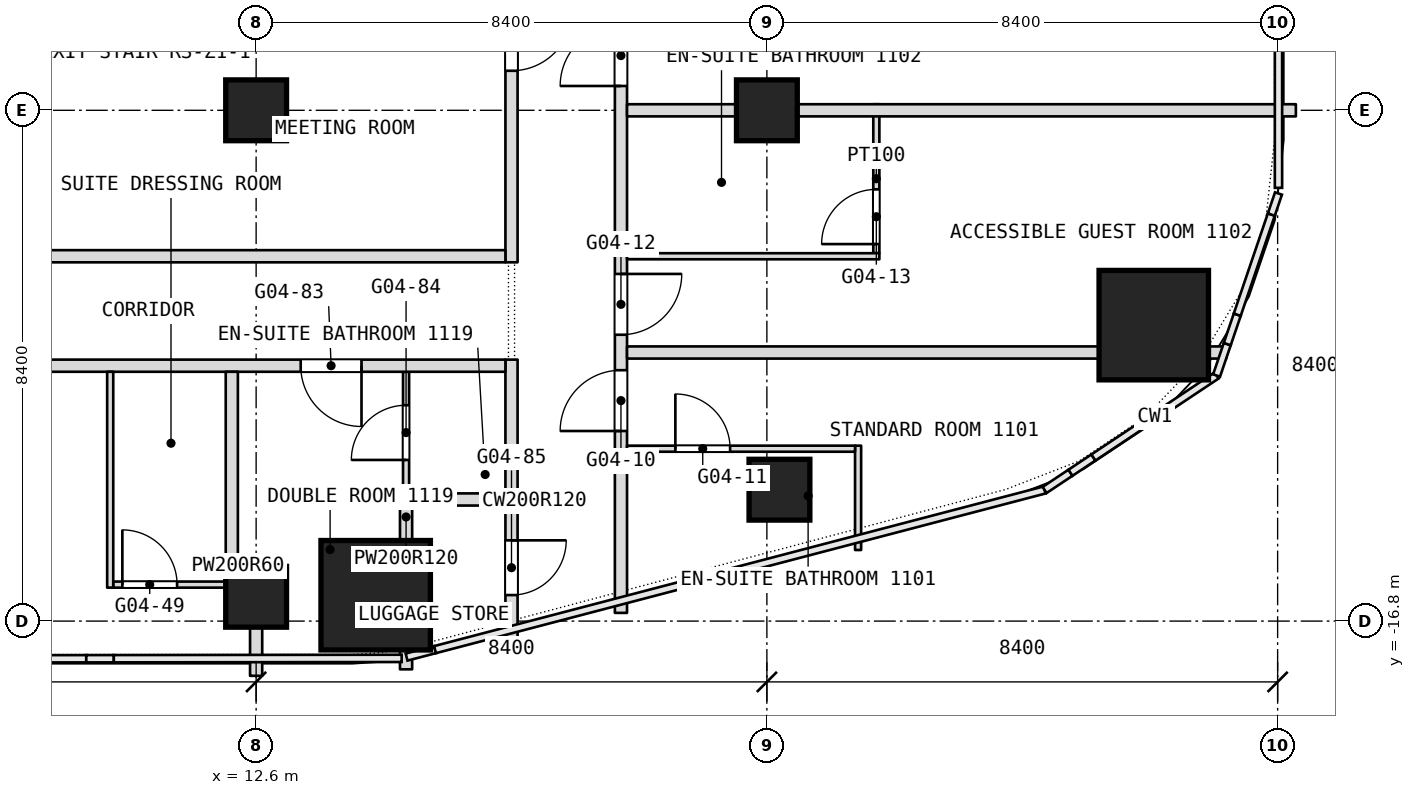
"""IFC4 building model, lengths in metres.
Left out: names, types, materials, properties, quantities, classifications, styles, units other than length and angle.
Written with IfcOpenShell. Run it as: python <this file> out.ifc"""

import sys

from ifc_helpers import new_model, si_unit, direction, frame, frame_2d, origin, origin_2d, place, context, subcontext, project, spatial, rectangle, extrude, element, fill, save


model = new_model("IFC4")
c1 = context("Model", 3, precision=1e-05, world=origin(), true_north=direction((0.0, 1.0)))
c2 = subcontext(c1, "Body", "Model", "MODEL_VIEW")
j1 = project(units=[si_unit("LENGTHUNIT", "METRE"), si_unit("PLANEANGLEUNIT", "RADIAN")], contexts=[c1])
p1 = place(None, origin())
s1 = spatial("IfcSite", under=j1, at=p1, CompositionType="ELEMENT")
p2 = place(p1, origin())
s2 = spatial("IfcBuilding", under=s1, at=p2, CompositionType="ELEMENT")
p3 = place(p2, frame((0.0, 0.0, 54.5)))
s3 = spatial("IfcBuildingStorey", under=s2, at=p3, CompositionType="ELEMENT", Elevation=54.5)
for number, where, z_axis, x_axis in (
    (1, (14.566, -16.375, 0.0), (0.0, 0.0, 1.0), (1.0, 0.0, 0.0)),
    (2, (27.363, -11.933, 0.0), (0.0, 0.0, 1.0), (1.0, 0.0, 0.0)),
):
    element("IfcColumn", number, at=place(p3, frame(where, z_axis=z_axis, x_axis=x_axis)), inside=s3, PredefinedType="COLUMN", context=c2, shape_type="SweptSolid", body=[
        extrude(rectangle(XDim=1.8, YDim=1.8, at=origin_2d()), origin(), (0.0, 0.0, 1.0), 3.6),
    ])
for number, where, z_axis, x_axis in (
    (3, (12.6, -8.4, 0.0), (0.0, 0.0, 1.0), (1.0, 0.0, 0.0)),
    (4, (21.0, -8.4, 0.0), (0.0, 0.0, 1.0), (1.0, 0.0, 0.0)),
    (5, (21.207, -14.639, 0.0), (0.0, 0.0, 1.0), (1.0, 0.0, 0.0)),
    (6, (12.6, -16.4, 0.0), (0.0, 0.0, 1.0), (1.0, 0.0, 0.0)),
):
    element("IfcColumn", number, at=place(p3, frame(where, z_axis=z_axis, x_axis=x_axis)), inside=s3, PredefinedType="COLUMN", context=c2, shape_type="SweptSolid", body=[
        extrude(rectangle(XDim=1.0, YDim=1.0, at=origin_2d()), origin(), (0.0, 0.0, 1.0), 3.6),
    ])
p4 = place(p3, frame((22.8, -10.75, 0.0), z_axis=(0.0, 0.0, 1.0), x_axis=(0.0, 1.0, 0.0)))
e7 = element("IfcWall", 7, at=p4, inside=s3, PredefinedType="PARTITIONING", context=c2, shape_type="SweptSolid", body=[
    extrude(rectangle(XDim=2.45, YDim=0.1, at=frame_2d((1.225, 0.0))), origin(), (0.0, 0.0, 1.0), 3.34),
])
p5 = place(p4, frame((0.15, 0.0, 0.0)))
e8 = element("IfcOpeningElement", 8, at=p5, cuts=e7, PredefinedType="OPENING", context=c2, shape_type="SweptSolid", body=[
    extrude(rectangle(XDim=0.9, YDim=2.1, at=frame_2d((0.45, 1.05))), frame((0.0, 0.05, 0.0), z_axis=(0.0, -1.0, 0.0), x_axis=(1.0, 0.0, 0.0)), (0.0, 0.0, 1.0), 0.1),
])
p6 = place(p3, frame((22.5, -15.631, 0.0), z_axis=(0.0, 0.0, 1.0), x_axis=(0.0, 1.0, 0.0)))
e9 = element("IfcWall", 9, at=p6, inside=s3, PredefinedType="PARTITIONING", context=c2, shape_type="SweptSolid", body=[
    extrude(rectangle(XDim=1.716, YDim=0.1, at=frame_2d((0.858, 0.0))), origin(), (0.0, 0.0, 1.0), 3.34),
])
p7 = place(p3, frame((18.6, -16.665, 0.0), z_axis=(0.0, 0.0, 1.0), x_axis=(0.0, 1.0, 0.0)))
e10 = element("IfcWall", 10, at=p7, inside=s3, PredefinedType="PARTITIONING", context=c2, shape_type="SweptSolid", body=[
    extrude(rectangle(XDim=50.205, YDim=0.2, at=frame_2d((25.103, 0.0))), origin(), (0.0, 0.0, 1.0), 3.34),
])
p8 = place(p7, frame((2.991, 0.0, 0.0)))
e11 = element("IfcOpeningElement", 11, at=p8, cuts=e10, PredefinedType="OPENING", context=c2, shape_type="SweptSolid", body=[
    extrude(rectangle(XDim=1.0, YDim=2.1, at=frame_2d((0.5, 1.05))), frame((0.0, 0.1, 0.0), z_axis=(0.0, -1.0, 0.0), x_axis=(1.0, 0.0, 0.0)), (0.0, 0.0, 1.0), 0.2),
])
p9 = place(p7, frame((4.574, 0.0, 0.0)))
e12 = element("IfcOpeningElement", 12, at=p9, cuts=e10, PredefinedType="OPENING", context=c2, shape_type="SweptSolid", body=[
    extrude(rectangle(XDim=1.0, YDim=2.1, at=frame_2d((0.5, 1.05))), frame((0.0, 0.1, 0.0), z_axis=(0.0, -1.0, 0.0), x_axis=(1.0, 0.0, 0.0)), (0.0, 0.0, 1.0), 0.2),
])
p10 = place(p7, frame((8.665, 0.0, 0.0)))
e13 = element("IfcOpeningElement", 13, at=p10, cuts=e10, PredefinedType="OPENING", context=c2, shape_type="SweptSolid", body=[
    extrude(rectangle(XDim=1.0, YDim=2.1, at=frame_2d((0.5, 1.05))), frame((0.0, 0.1, 0.0), z_axis=(0.0, -1.0, 0.0), x_axis=(1.0, 0.0, 0.0)), (0.0, 0.0, 1.0), 0.2),
])
p11 = place(p7, frame((15.265, 0.0, 0.0)))
e14 = element("IfcOpeningElement", 14, at=p11, cuts=e10, PredefinedType="OPENING", context=c2, shape_type="SweptSolid", body=[
    extrude(rectangle(XDim=1.0, YDim=2.1, at=frame_2d((0.5, 1.05))), frame((0.0, 0.1, 0.0), z_axis=(0.0, -1.0, 0.0), x_axis=(1.0, 0.0, 0.0)), (0.0, 0.0, 1.0), 0.2),
])
p12 = place(p7, frame((19.465, 0.0, 0.0)))
e15 = element("IfcOpeningElement", 15, at=p12, cuts=e10, PredefinedType="OPENING", context=c2, shape_type="SweptSolid", body=[
    extrude(rectangle(XDim=1.0, YDim=2.1, at=frame_2d((0.5, 1.05))), frame((0.0, 0.1, 0.0), z_axis=(0.0, -1.0, 0.0), x_axis=(1.0, 0.0, 0.0)), (0.0, 0.0, 1.0), 0.2),
])
p13 = place(p7, frame((21.265, 0.0, 0.0)))
e16 = element("IfcOpeningElement", 16, at=p13, cuts=e10, PredefinedType="OPENING", context=c2, shape_type="SweptSolid", body=[
    extrude(rectangle(XDim=1.0, YDim=2.1, at=frame_2d((0.5, 1.05))), frame((0.0, 0.1, 0.0), z_axis=(0.0, -1.0, 0.0), x_axis=(1.0, 0.0, 0.0)), (0.0, 0.0, 1.0), 0.2),
])
p14 = place(p7, frame((28.365, 0.0, 0.0)))
e17 = element("IfcOpeningElement", 17, at=p14, cuts=e10, PredefinedType="OPENING", context=c2, shape_type="SweptSolid", body=[
    extrude(rectangle(XDim=1.8, YDim=2.1, at=frame_2d((0.9, 1.05))), frame((0.0, 0.1, 0.0), z_axis=(0.0, -1.0, 0.0), x_axis=(1.0, 0.0, 0.0)), (0.0, 0.0, 1.0), 0.2),
])
p15 = place(p7, frame((37.165, 0.0, 0.0)))
e18 = element("IfcOpeningElement", 18, at=p15, cuts=e10, PredefinedType="OPENING", context=c2, shape_type="SweptSolid", body=[
    extrude(rectangle(XDim=1.1, YDim=2.1, at=frame_2d((0.55, 1.05))), frame((0.0, 0.1, 0.0), z_axis=(0.0, -1.0, 0.0), x_axis=(1.0, 0.0, 0.0)), (0.0, 0.0, 1.0), 0.2),
])
p16 = place(p7, frame((43.415, 0.0, 0.0)))
e19 = element("IfcOpeningElement", 19, at=p16, cuts=e10, PredefinedType="OPENING", context=c2, shape_type="SweptSolid", body=[
    extrude(rectangle(XDim=1.1, YDim=2.1, at=frame_2d((0.55, 1.05))), frame((0.0, 0.1, 0.0), z_axis=(0.0, -1.0, 0.0), x_axis=(1.0, 0.0, 0.0)), (0.0, 0.0, 1.0), 0.2),
])
p17 = place(p3, frame((16.8, -17.143, 0.0), z_axis=(0.0, 0.0, 1.0), x_axis=(0.0, 1.0, 0.0)))
e20 = element("IfcWall", 20, at=p17, inside=s3, PredefinedType="PARTITIONING", context=c2, shape_type="SweptSolid", body=[
    extrude(rectangle(XDim=4.643, YDim=0.2, at=frame_2d((2.322, 0.0))), origin(), (0.0, 0.0, 1.0), 3.34),
])
p18 = place(p17, frame((0.771, 0.0, 0.0)))
e21 = element("IfcOpeningElement", 21, at=p18, cuts=e20, PredefinedType="OPENING", context=c2, shape_type="SweptSolid", body=[
    extrude(rectangle(XDim=0.9, YDim=2.1, at=frame_2d((0.45, 1.05))), frame((0.0, 0.1, 0.0), z_axis=(0.0, -1.0, 0.0), x_axis=(1.0, 0.0, 0.0)), (0.0, 0.0, 1.0), 0.2),
])
p19 = place(p3, frame((16.8, -10.9, 0.0), z_axis=(0.0, 0.0, 1.0), x_axis=(0.0, 1.0, 0.0)))
e22 = element("IfcWall", 22, at=p19, inside=s3, PredefinedType="PARTITIONING", context=c2, shape_type="SweptSolid", body=[
    extrude(rectangle(XDim=7.3, YDim=0.2, at=frame_2d((3.65, 0.0))), origin(), (0.0, 0.0, 1.0), 3.34),
])
p20 = place(p19, frame((3.15, 0.0, 0.0)))
e23 = element("IfcOpeningElement", 23, at=p20, cuts=e22, PredefinedType="OPENING", context=c2, shape_type="SweptSolid", body=[
    extrude(rectangle(XDim=1.0, YDim=2.1, at=frame_2d((0.5, 1.05))), frame((0.0, 0.1, 0.0), z_axis=(0.0, -1.0, 0.0), x_axis=(1.0, 0.0, 0.0)), (0.0, 0.0, 1.0), 0.2),
])
p21 = place(p3, frame((10.25, -16.2, 0.0), z_axis=(0.0, 0.0, 1.0), x_axis=(1.0, 0.0, 0.0)))
e24 = element("IfcWall", 24, at=p21, inside=s3, PredefinedType="PARTITIONING", context=c2, shape_type="SweptSolid", body=[
    extrude(rectangle(XDim=2.45, YDim=0.1, at=frame_2d((1.225, 0.0))), origin(), (0.0, 0.0, 1.0), 3.34),
])
p22 = place(p21, frame((0.15, 0.0, 0.0)))
e25 = element("IfcOpeningElement", 25, at=p22, cuts=e24, PredefinedType="OPENING", context=c2, shape_type="SweptSolid", body=[
    extrude(rectangle(XDim=0.9, YDim=2.1, at=frame_2d((0.45, 1.05))), frame((0.0, 0.05, 0.0), z_axis=(0.0, -1.0, 0.0), x_axis=(1.0, 0.0, 0.0)), (0.0, 0.0, 1.0), 0.1),
])
p23 = place(p3, frame((12.1, -15.9, 0.0), z_axis=(0.0, 0.0, 1.0), x_axis=(1.0, 0.0, 0.0)))
e26 = element("IfcWall", 26, at=p23, inside=s3, PredefinedType="PARTITIONING", context=c2, shape_type="SweptSolid", body=[
    extrude(rectangle(XDim=0.4, YDim=0.2, at=frame_2d((0.2, 0.0))), origin(), (0.0, 0.0, 1.0), 3.34),
])
p24 = place(p3, frame((15.066, -17.593, 0.0), z_axis=(0.0, 0.0, 1.0), x_axis=(0.0, 1.0, 0.0)))
e27 = element("IfcWall", 27, at=p24, inside=s3, PredefinedType="PARTITIONING", context=c2, shape_type="SweptSolid", body=[
    extrude(rectangle(XDim=0.318, YDim=0.2, at=frame_2d((0.159, 0.0))), origin(), (0.0, 0.0, 1.0), 3.34),
])
p25 = place(p3, frame((15.066, -15.475, 0.0), z_axis=(0.0, 0.0, 1.0), x_axis=(0.0, 1.0, 0.0)))
e28 = element("IfcWall", 28, at=p25, inside=s3, PredefinedType="PARTITIONING", context=c2, shape_type="SweptSolid", body=[
    extrude(rectangle(XDim=0.775, YDim=0.2, at=frame_2d((0.388, 0.0))), origin(), (0.0, 0.0, 1.0), 3.34),
])
p26 = place(p3, frame((15.066, -14.9, 0.0), z_axis=(0.0, 0.0, 1.0), x_axis=(0.0, 1.0, 0.0)))
e29 = element("IfcWall", 29, at=p26, inside=s3, PredefinedType="PARTITIONING", context=c2, shape_type="SweptSolid", body=[
    extrude(rectangle(XDim=2.2, YDim=0.1, at=frame_2d((1.1, 0.0))), origin(), (0.0, 0.0, 1.0), 3.34),
])
p27 = place(p26, frame((0.75, 0.0, 0.0)))
e30 = element("IfcOpeningElement", 30, at=p27, cuts=e29, PredefinedType="OPENING", context=c2, shape_type="SweptSolid", body=[
    extrude(rectangle(XDim=0.9, YDim=2.1, at=frame_2d((0.45, 1.05))), frame((0.0, 0.05, 0.0), z_axis=(0.0, -1.0, 0.0), x_axis=(1.0, 0.0, 0.0)), (0.0, 0.0, 1.0), 0.1),
])
p28 = place(p3, frame((15.116, -14.8, 0.0), z_axis=(0.0, 0.0, 1.0), x_axis=(1.0, 0.0, 0.0)))
e31 = element("IfcWall", 31, at=p28, inside=s3, PredefinedType="PARTITIONING", context=c2, shape_type="SweptSolid", body=[
    extrude(rectangle(XDim=1.584, YDim=0.2, at=frame_2d((0.792, 0.0))), origin(), (0.0, 0.0, 1.0), 3.34),
])
p29 = place(p3, frame((18.7, -13.965, 0.0), z_axis=(0.0, 0.0, 1.0), x_axis=(1.0, 0.0, 0.0)))
e32 = element("IfcWall", 32, at=p29, inside=s3, PredefinedType="PARTITIONING", context=c2, shape_type="SweptSolid", body=[
    extrude(rectangle(XDim=3.75, YDim=0.1, at=frame_2d((1.875, 0.0))), origin(), (0.0, 0.0, 1.0), 3.34),
])
p30 = place(p29, frame((0.795, 0.0, 0.0)))
e33 = element("IfcOpeningElement", 33, at=p30, cuts=e32, PredefinedType="OPENING", context=c2, shape_type="SweptSolid", body=[
    extrude(rectangle(XDim=0.9, YDim=2.1, at=frame_2d((0.45, 1.05))), frame((0.0, 0.05, 0.0), z_axis=(0.0, -1.0, 0.0), x_axis=(1.0, 0.0, 0.0)), (0.0, 0.0, 1.0), 0.1),
])
p31 = place(p3, frame((12.6, -17.7, 0.0), z_axis=(0.0, 0.0, 1.0), x_axis=(0.0, 1.0, 0.0)))
e34 = element("IfcWall", 34, at=p31, inside=s3, PredefinedType="PARTITIONING", context=c2, shape_type="SweptSolid", body=[
    extrude(rectangle(XDim=1.9, YDim=0.2, at=frame_2d((0.95, 0.0))), origin(), (0.0, 0.0, 1.0), 3.34),
])
p32 = place(p3, frame((-16.7, -12.6, 0.0), z_axis=(0.0, 0.0, 1.0), x_axis=(1.0, 0.0, 0.0)))
e35 = element("IfcWall", 35, at=p32, inside=s3, PredefinedType="PARTITIONING", context=c2, shape_type="SweptSolid", body=[
    extrude(rectangle(XDim=33.4, YDim=0.2, at=frame_2d((16.7, 0.0))), origin(), (0.0, 0.0, 1.0), 3.34),
])
p33 = place(p32, frame((6.9, 0.0, 0.0)))
e36 = element("IfcOpeningElement", 36, at=p33, cuts=e35, PredefinedType="OPENING", context=c2, shape_type="SweptSolid", body=[
    extrude(rectangle(XDim=1.0, YDim=2.1, at=frame_2d((0.5, 1.05))), frame((0.0, 0.1, 0.0), z_axis=(0.0, -1.0, 0.0), x_axis=(1.0, 0.0, 0.0)), (0.0, 0.0, 1.0), 0.2),
])
p34 = place(p32, frame((8.7, 0.0, 0.0)))
e37 = element("IfcOpeningElement", 37, at=p34, cuts=e35, PredefinedType="OPENING", context=c2, shape_type="SweptSolid", body=[
    extrude(rectangle(XDim=1.0, YDim=2.1, at=frame_2d((0.5, 1.05))), frame((0.0, 0.1, 0.0), z_axis=(0.0, -1.0, 0.0), x_axis=(1.0, 0.0, 0.0)), (0.0, 0.0, 1.0), 0.2),
])
p35 = place(p32, frame((16.1, 0.0, 0.0)))
e38 = element("IfcOpeningElement", 38, at=p35, cuts=e35, PredefinedType="OPENING", context=c2, shape_type="SweptSolid", body=[
    extrude(rectangle(XDim=1.1, YDim=2.1, at=frame_2d((0.55, 1.05))), frame((0.0, 0.1, 0.0), z_axis=(0.0, -1.0, 0.0), x_axis=(1.0, 0.0, 0.0)), (0.0, 0.0, 1.0), 0.2),
])
p36 = place(p32, frame((24.6, 0.0, 0.0)))
e39 = element("IfcOpeningElement", 39, at=p36, cuts=e35, PredefinedType="OPENING", context=c2, shape_type="SweptSolid", body=[
    extrude(rectangle(XDim=1.1, YDim=2.1, at=frame_2d((0.55, 1.05))), frame((0.0, 0.1, 0.0), z_axis=(0.0, -1.0, 0.0), x_axis=(1.0, 0.0, 0.0)), (0.0, 0.0, 1.0), 0.2),
])
p37 = place(p32, frame((2.317, 0.0, 0.0)))
e40 = element("IfcOpeningElement", 40, at=p37, cuts=e35, PredefinedType="OPENING", context=c2, shape_type="SweptSolid", body=[
    extrude(rectangle(XDim=1.0, YDim=2.1, at=frame_2d((0.5, 1.05))), frame((0.0, 0.1, 0.0), z_axis=(0.0, -1.0, 0.0), x_axis=(1.0, 0.0, 0.0)), (0.0, 0.0, 1.0), 0.2),
])
p38 = place(p32, frame((30.033, 0.0, 0.0)))
e41 = element("IfcOpeningElement", 41, at=p38, cuts=e35, PredefinedType="OPENING", context=c2, shape_type="SweptSolid", body=[
    extrude(rectangle(XDim=1.0, YDim=2.1, at=frame_2d((0.5, 1.05))), frame((0.0, 0.1, 0.0), z_axis=(0.0, -1.0, 0.0), x_axis=(1.0, 0.0, 0.0)), (0.0, 0.0, 1.0), 0.2),
])
p39 = place(p3, frame((18.7, -12.383, 0.0), z_axis=(0.0, 0.0, 1.0), x_axis=(1.0, 0.0, 0.0)))
e42 = element("IfcWall", 42, at=p39, inside=s3, PredefinedType="PARTITIONING", context=c2, shape_type="SweptSolid", body=[
    extrude(rectangle(XDim=7.763, YDim=0.2, at=frame_2d((3.881, 0.0))), origin(), (0.0, 0.0, 1.0), 3.34),
])
p40 = place(p3, frame((28.263, -12.383, 0.0), z_axis=(0.0, 0.0, 1.0), x_axis=(1.0, 0.0, 0.0)))
e43 = element("IfcWall", 43, at=p40, inside=s3, PredefinedType="PARTITIONING", context=c2, shape_type="SweptSolid", body=[
    extrude(rectangle(XDim=0.29, YDim=0.2, at=frame_2d((0.145, 0.0))), origin(), (0.0, 0.0, 1.0), 3.34),
])
p41 = place(p3, frame((12.2, -15.8, 0.0), z_axis=(0.0, 0.0, 1.0), x_axis=(0.0, 1.0, 0.0)))
e44 = element("IfcWall", 44, at=p41, inside=s3, PredefinedType="PARTITIONING", context=c2, shape_type="SweptSolid", body=[
    extrude(rectangle(XDim=3.1, YDim=0.2, at=frame_2d((1.55, 0.0))), origin(), (0.0, 0.0, 1.0), 3.34),
])
p42 = place(p3, frame((-16.7, -10.8, 0.0), z_axis=(0.0, 0.0, 1.0), x_axis=(1.0, 0.0, 0.0)))
e45 = element("IfcWall", 45, at=p42, inside=s3, PredefinedType="PARTITIONING", context=c2, shape_type="SweptSolid", body=[
    extrude(rectangle(XDim=33.4, YDim=0.2, at=frame_2d((16.7, 0.0))), origin(), (0.0, 0.0, 1.0), 3.34),
])
p43 = place(p42, frame((5.7, 0.0, 0.0)))
e46 = element("IfcOpeningElement", 46, at=p43, cuts=e45, PredefinedType="OPENING", context=c2, shape_type="SweptSolid", body=[
    extrude(rectangle(XDim=1.0, YDim=2.1, at=frame_2d((0.5, 1.05))), frame((0.0, 0.1, 0.0), z_axis=(0.0, -1.0, 0.0), x_axis=(1.0, 0.0, 0.0)), (0.0, 0.0, 1.0), 0.2),
])
p44 = place(p42, frame((18.3, 0.0, 0.0)))
e47 = element("IfcOpeningElement", 47, at=p44, cuts=e45, PredefinedType="OPENING", context=c2, shape_type="SweptSolid", body=[
    extrude(rectangle(XDim=1.0, YDim=2.1, at=frame_2d((0.5, 1.05))), frame((0.0, 0.1, 0.0), z_axis=(0.0, -1.0, 0.0), x_axis=(1.0, 0.0, 0.0)), (0.0, 0.0, 1.0), 0.2),
])
p45 = place(p3, frame((18.7, -10.8, 0.0), z_axis=(0.0, 0.0, 1.0), x_axis=(1.0, 0.0, 0.0)))
e48 = element("IfcWall", 48, at=p45, inside=s3, PredefinedType="PARTITIONING", context=c2, shape_type="SweptSolid", body=[
    extrude(rectangle(XDim=4.15, YDim=0.1, at=frame_2d((2.075, 0.0))), origin(), (0.0, 0.0, 1.0), 3.34),
])
p46 = place(p3, frame((10.2, -16.25, 0.0), z_axis=(0.0, 0.0, 1.0), x_axis=(0.0, 1.0, 0.0)))
e49 = element("IfcWall", 49, at=p46, inside=s3, PredefinedType="PARTITIONING", context=c2, shape_type="SweptSolid", body=[
    extrude(rectangle(XDim=3.55, YDim=0.1, at=frame_2d((1.775, 0.0))), origin(), (0.0, 0.0, 1.0), 3.34),
])
p47 = place(p3, frame((18.7, -8.4, 0.0), z_axis=(0.0, 0.0, 1.0), x_axis=(1.0, 0.0, 0.0)))
e50 = element("IfcWall", 50, at=p47, inside=s3, PredefinedType="PARTITIONING", context=c2, shape_type="SweptSolid", body=[
    extrude(rectangle(XDim=11.0, YDim=0.2, at=frame_2d((5.5, 0.0))), origin(), (0.0, 0.0, 1.0), 2.84),
])
p48 = place(p5, origin())
e51 = element("IfcDoor", 51, at=p48, inside=s3, OperationType="SINGLE_SWING_LEFT", PredefinedType="DOOR", context=c2, shape_type="SweptSolid", body=[
    extrude(rectangle(XDim=0.9, YDim=2.1, at=frame_2d((0.45, 1.05))), frame((0.0, 0.025, 0.0), z_axis=(0.0, -1.0, 0.0), x_axis=(1.0, 0.0, 0.0)), (0.0, 0.0, 1.0), 0.05),
])
fill(e8, e51)
p49 = place(p8, origin())
e52 = element("IfcDoor", 52, at=p49, inside=s3, OperationType="SINGLE_SWING_RIGHT", PredefinedType="DOOR", context=c2, shape_type="SweptSolid", body=[
    extrude(rectangle(XDim=1.0, YDim=2.1, at=frame_2d((0.5, 1.05))), frame((0.0, 0.025, 0.0), z_axis=(0.0, -1.0, 0.0), x_axis=(1.0, 0.0, 0.0)), (0.0, 0.0, 1.0), 0.05),
])
fill(e11, e52)
p50 = place(p9, origin())
e53 = element("IfcDoor", 53, at=p50, inside=s3, OperationType="SINGLE_SWING_RIGHT", PredefinedType="DOOR", context=c2, shape_type="SweptSolid", body=[
    extrude(rectangle(XDim=1.0, YDim=2.1, at=frame_2d((0.5, 1.05))), frame((0.0, 0.025, 0.0), z_axis=(0.0, -1.0, 0.0), x_axis=(1.0, 0.0, 0.0)), (0.0, 0.0, 1.0), 0.05),
])
fill(e12, e53)
p51 = place(p10, origin())
e54 = element("IfcDoor", 54, at=p51, inside=s3, OperationType="SINGLE_SWING_RIGHT", PredefinedType="DOOR", context=c2, shape_type="SweptSolid", body=[
    extrude(rectangle(XDim=1.0, YDim=2.1, at=frame_2d((0.5, 1.05))), frame((0.0, 0.025, 0.0), z_axis=(0.0, -1.0, 0.0), x_axis=(1.0, 0.0, 0.0)), (0.0, 0.0, 1.0), 0.05),
])
fill(e13, e54)
p52 = place(p18, origin())
e55 = element("IfcDoor", 55, at=p52, inside=s3, OperationType="SINGLE_SWING_RIGHT", PredefinedType="DOOR", context=c2, shape_type="SweptSolid", body=[
    extrude(rectangle(XDim=0.9, YDim=2.1, at=frame_2d((0.45, 1.05))), frame((0.0, 0.025, 0.0), z_axis=(0.0, -1.0, 0.0), x_axis=(1.0, 0.0, 0.0)), (0.0, 0.0, 1.0), 0.05),
])
fill(e21, e55)
p53 = place(p20, origin())
e56 = element("IfcDoor", 56, at=p53, inside=s3, OperationType="SINGLE_SWING_RIGHT", PredefinedType="DOOR", context=c2, shape_type="SweptSolid", body=[
    extrude(rectangle(XDim=1.0, YDim=2.1, at=frame_2d((0.5, 1.05))), frame((0.0, 0.025, 0.0), z_axis=(0.0, -1.0, 0.0), x_axis=(1.0, 0.0, 0.0)), (0.0, 0.0, 1.0), 0.05),
])
fill(e23, e56)
p54 = place(p22, origin())
e57 = element("IfcDoor", 57, at=p54, inside=s3, OperationType="SINGLE_SWING_LEFT", PredefinedType="DOOR", context=c2, shape_type="SweptSolid", body=[
    extrude(rectangle(XDim=0.9, YDim=2.1, at=frame_2d((0.45, 1.05))), frame((0.0, 0.025, 0.0), z_axis=(0.0, -1.0, 0.0), x_axis=(1.0, 0.0, 0.0)), (0.0, 0.0, 1.0), 0.05),
])
fill(e25, e57)
p55 = place(p27, origin())
e58 = element("IfcDoor", 58, at=p55, inside=s3, OperationType="SINGLE_SWING_RIGHT", PredefinedType="DOOR", context=c2, shape_type="SweptSolid", body=[
    extrude(rectangle(XDim=0.9, YDim=2.1, at=frame_2d((0.45, 1.05))), frame((0.0, 0.025, 0.0), z_axis=(0.0, -1.0, 0.0), x_axis=(1.0, 0.0, 0.0)), (0.0, 0.0, 1.0), 0.05),
])
fill(e30, e58)
p56 = place(p30, origin())
e59 = element("IfcDoor", 59, at=p56, inside=s3, OperationType="SINGLE_SWING_LEFT", PredefinedType="DOOR", context=c2, shape_type="SweptSolid", body=[
    extrude(rectangle(XDim=0.9, YDim=2.1, at=frame_2d((0.45, 1.05))), frame((0.0, 0.025, 0.0), z_axis=(0.0, -1.0, 0.0), x_axis=(1.0, 0.0, 0.0)), (0.0, 0.0, 1.0), 0.05),
])
fill(e33, e59)
p57 = place(p38, origin())
e60 = element("IfcDoor", 60, at=p57, inside=s3, OperationType="SINGLE_SWING_LEFT", PredefinedType="DOOR", context=c2, shape_type="SweptSolid", body=[
    extrude(rectangle(XDim=1.0, YDim=2.1, at=frame_2d((0.5, 1.05))), frame((0.0, 0.025, 0.0), z_axis=(0.0, -1.0, 0.0), x_axis=(1.0, 0.0, 0.0)), (0.0, 0.0, 1.0), 0.05),
])
fill(e41, e60)
save(model, sys.argv[1])
